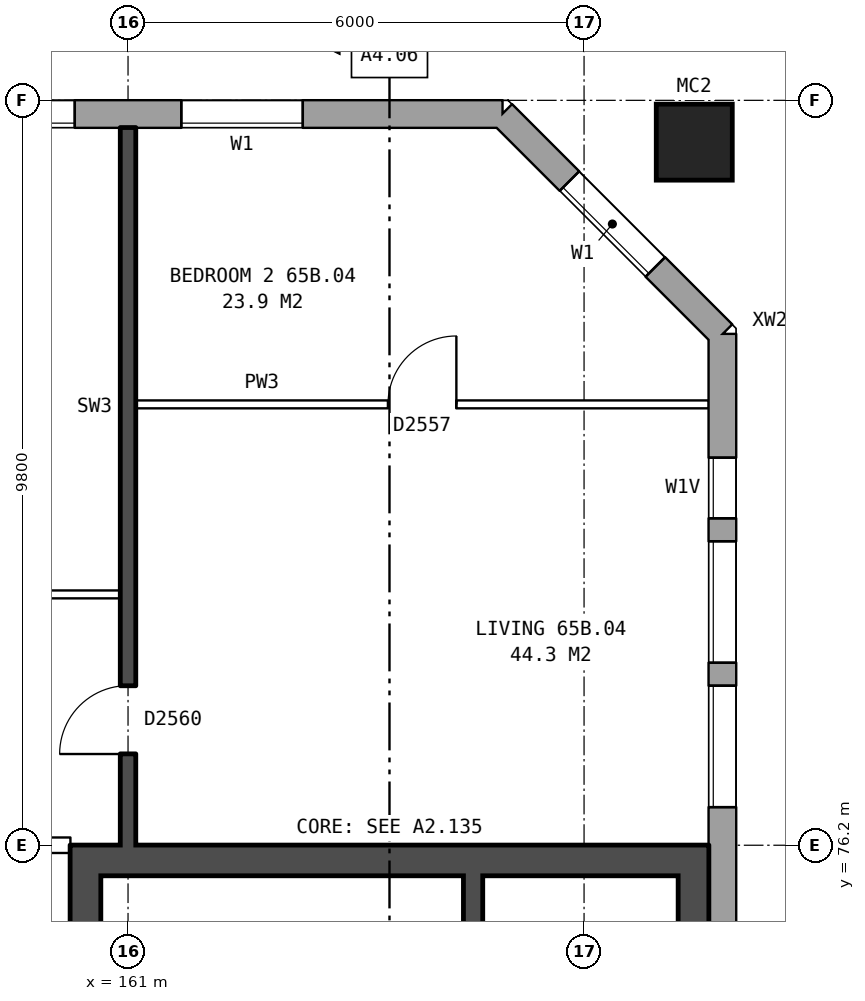
"""IFC4 building model, lengths in metres.
Left out: names, types, materials, properties, quantities, classifications, styles, units other than length and angle.
Written with IfcOpenShell. Run it as: python <this file> out.ifc"""

import sys

from ifc_helpers import new_model, si_unit, direction, frame, frame_2d, origin, origin_2d, place, context, subcontext, project, spatial, rectangle, hollow_rectangle, extrude, element, fill, save


model = new_model("IFC4")
c1 = context("Model", 3, precision=1e-05, world=origin(), true_north=direction((0.0, 1.0)))
c2 = subcontext(c1, "Body", "Model", "MODEL_VIEW")
j1 = project(units=[si_unit("LENGTHUNIT", "METRE"), si_unit("PLANEANGLEUNIT", "RADIAN")], contexts=[c1])
p1 = place(None, origin())
s1 = spatial("IfcSite", under=j1, at=p1, CompositionType="ELEMENT")
p2 = place(p1, origin())
s2 = spatial("IfcBuilding", under=s1, at=p2, CompositionType="ELEMENT")
p3 = place(p2, frame((0.0, 0.0, 230.7)))
s3 = spatial("IfcBuildingStorey", under=s2, at=p3, CompositionType="ELEMENT", Elevation=230.7)
p4 = place(p3, frame((168.45, 85.45, 0.0), z_axis=(0.0, 0.0, 1.0), x_axis=(1.0, 0.0, 0.0)))
e1 = element("IfcColumn", 1, at=p4, inside=s3, PredefinedType="COLUMN", context=c2, shape_type="SweptSolid", body=[
    extrude(hollow_rectangle(XDim=1.0, YDim=1.0, WallThickness=0.055, at=origin_2d()), origin(), (0.0, 0.0, 1.0), 3.1),
])
p5 = place(p3, frame((168.82, 57.075, 0.0), z_axis=(0.0, 0.0, 1.0), x_axis=(0.0, 1.0, 0.0)))
e2 = element("IfcWall", 2, at=p5, inside=s3, PredefinedType="STANDARD", context=c2, shape_type="SweptSolid", body=[
    extrude(rectangle(XDim=25.851, YDim=0.36, at=frame_2d((12.925, 0.0))), origin(), (0.0, 0.0, 1.0), 2.85),
])
p6 = place(p5, frame((1.575, 0.0, 1.7)))
e3 = element("IfcOpeningElement", 3, at=p6, cuts=e2, PredefinedType="OPENING", context=c2, shape_type="SweptSolid", body=[
    extrude(rectangle(XDim=0.6, YDim=0.9, at=frame_2d((0.3, 0.45))), frame((0.0, 0.19, 0.0), z_axis=(0.0, -1.0, 0.0), x_axis=(1.0, 0.0, 0.0)), (0.0, 0.0, 1.0), 0.38),
])
p7 = place(p5, frame((4.625, 0.0, 0.8)))
e4 = element("IfcOpeningElement", 4, at=p7, cuts=e2, PredefinedType="OPENING", context=c2, shape_type="SweptSolid", body=[
    extrude(rectangle(XDim=1.6, YDim=1.8, at=frame_2d((0.8, 0.9))), frame((0.0, 0.19, 0.0), z_axis=(0.0, -1.0, 0.0), x_axis=(1.0, 0.0, 0.0)), (0.0, 0.0, 1.0), 0.38),
])
p8 = place(p5, frame((19.625, 0.0, 0.8)))
e5 = element("IfcOpeningElement", 5, at=p8, cuts=e2, PredefinedType="OPENING", context=c2, shape_type="SweptSolid", body=[
    extrude(rectangle(XDim=1.6, YDim=1.8, at=frame_2d((0.8, 0.9))), frame((0.0, 0.19, 0.0), z_axis=(0.0, -1.0, 0.0), x_axis=(1.0, 0.0, 0.0)), (0.0, 0.0, 1.0), 0.38),
])
p9 = place(p5, frame((21.525, 0.0, 0.8)))
e6 = element("IfcOpeningElement", 6, at=p9, cuts=e2, PredefinedType="OPENING", context=c2, shape_type="SweptSolid", body=[
    extrude(rectangle(XDim=1.6, YDim=1.8, at=frame_2d((0.8, 0.9))), frame((0.0, 0.19, 0.0), z_axis=(0.0, -1.0, 0.0), x_axis=(1.0, 0.0, 0.0)), (0.0, 0.0, 1.0), 0.38),
])
p10 = place(p5, frame((2.475, 0.0, 0.8)))
e7 = element("IfcOpeningElement", 7, at=p10, cuts=e2, PredefinedType="OPENING", context=c2, shape_type="SweptSolid", body=[
    extrude(rectangle(XDim=1.2, YDim=1.8, at=frame_2d((0.6, 0.9))), frame((0.0, 0.19, 0.0), z_axis=(0.0, -1.0, 0.0), x_axis=(1.0, 0.0, 0.0)), (0.0, 0.0, 1.0), 0.38),
])
p11 = place(p5, frame((23.425, 0.0, 1.7)))
e8 = element("IfcOpeningElement", 8, at=p11, cuts=e2, PredefinedType="OPENING", context=c2, shape_type="SweptSolid", body=[
    extrude(rectangle(XDim=0.8, YDim=0.9, at=frame_2d((0.4, 0.45))), frame((0.0, 0.19, 0.0), z_axis=(0.0, -1.0, 0.0), x_axis=(1.0, 0.0, 0.0)), (0.0, 0.0, 1.0), 0.38),
])
p12 = place(p3, frame((168.82, 82.925, 0.0), z_axis=(0.0, 0.0, 1.0), x_axis=(-0.707106781187, 0.707106781187, 0.0)))
e9 = element("IfcWall", 9, at=p12, inside=s3, PredefinedType="STANDARD", context=c2, shape_type="SweptSolid", body=[
    extrude(rectangle(XDim=4.094, YDim=0.36, at=frame_2d((2.047, 0.0))), origin(), (0.0, 0.0, 1.0), 2.85),
])
p13 = place(p12, frame((1.247, 0.0, 0.8)))
e10 = element("IfcOpeningElement", 10, at=p13, cuts=e9, PredefinedType="OPENING", context=c2, shape_type="SweptSolid", body=[
    extrude(rectangle(XDim=1.6, YDim=1.8, at=frame_2d((0.8, 0.9))), frame((0.0, 0.19, 0.0), z_axis=(0.0, -1.0, 0.0), x_axis=(1.0, 0.0, 0.0)), (0.0, 0.0, 1.0), 0.38),
])
p14 = place(p3, frame((165.925, 85.82, 0.0), z_axis=(0.0, 0.0, 1.0), x_axis=(-1.0, 0.0, 0.0)))
e11 = element("IfcWall", 11, at=p14, inside=s3, PredefinedType="STANDARD", context=c2, shape_type="SweptSolid", body=[
    extrude(rectangle(XDim=33.875, YDim=0.36, at=frame_2d((16.938, 0.0))), origin(), (0.0, 0.0, 1.0), 2.85),
])
p15 = place(p14, frame((2.625, 0.0, 0.8)))
e12 = element("IfcOpeningElement", 12, at=p15, cuts=e11, PredefinedType="OPENING", context=c2, shape_type="SweptSolid", body=[
    extrude(rectangle(XDim=1.6, YDim=1.8, at=frame_2d((0.8, 0.9))), frame((0.0, 0.19, 0.0), z_axis=(0.0, -1.0, 0.0), x_axis=(1.0, 0.0, 0.0)), (0.0, 0.0, 1.0), 0.38),
])
p16 = place(p14, frame((5.625, 0.0, 0.8)))
e13 = element("IfcOpeningElement", 13, at=p16, cuts=e11, PredefinedType="OPENING", context=c2, shape_type="SweptSolid", body=[
    extrude(rectangle(XDim=1.6, YDim=1.8, at=frame_2d((0.8, 0.9))), frame((0.0, 0.19, 0.0), z_axis=(0.0, -1.0, 0.0), x_axis=(1.0, 0.0, 0.0)), (0.0, 0.0, 1.0), 0.38),
])
p17 = place(p14, frame((8.625, 0.0, 0.8)))
e14 = element("IfcOpeningElement", 14, at=p17, cuts=e11, PredefinedType="OPENING", context=c2, shape_type="SweptSolid", body=[
    extrude(rectangle(XDim=1.6, YDim=1.8, at=frame_2d((0.8, 0.9))), frame((0.0, 0.19, 0.0), z_axis=(0.0, -1.0, 0.0), x_axis=(1.0, 0.0, 0.0)), (0.0, 0.0, 1.0), 0.38),
])
p18 = place(p14, frame((11.125, 0.0, 0.8)))
e15 = element("IfcOpeningElement", 15, at=p18, cuts=e11, PredefinedType="OPENING", context=c2, shape_type="SweptSolid", body=[
    extrude(rectangle(XDim=1.4, YDim=1.8, at=frame_2d((0.7, 0.9))), frame((0.0, 0.19, 0.0), z_axis=(0.0, -1.0, 0.0), x_axis=(1.0, 0.0, 0.0)), (0.0, 0.0, 1.0), 0.38),
])
p19 = place(p14, frame((14.625, 0.0, 0.8)))
e16 = element("IfcOpeningElement", 16, at=p19, cuts=e11, PredefinedType="OPENING", context=c2, shape_type="SweptSolid", body=[
    extrude(rectangle(XDim=1.6, YDim=1.8, at=frame_2d((0.8, 0.9))), frame((0.0, 0.19, 0.0), z_axis=(0.0, -1.0, 0.0), x_axis=(1.0, 0.0, 0.0)), (0.0, 0.0, 1.0), 0.38),
])
p20 = place(p14, frame((17.125, 0.0, 0.25)))
e17 = element("IfcOpeningElement", 17, at=p20, cuts=e11, PredefinedType="OPENING", context=c2, shape_type="SweptSolid", body=[
    extrude(rectangle(XDim=0.6, YDim=1.2, at=frame_2d((0.3, 0.6))), frame((0.0, 0.19, 0.0), z_axis=(0.0, -1.0, 0.0), x_axis=(1.0, 0.0, 0.0)), (0.0, 0.0, 1.0), 0.38),
])
p21 = place(p14, frame((20.625, 0.0, 0.8)))
e18 = element("IfcOpeningElement", 18, at=p21, cuts=e11, PredefinedType="OPENING", context=c2, shape_type="SweptSolid", body=[
    extrude(rectangle(XDim=1.6, YDim=1.8, at=frame_2d((0.8, 0.9))), frame((0.0, 0.19, 0.0), z_axis=(0.0, -1.0, 0.0), x_axis=(1.0, 0.0, 0.0)), (0.0, 0.0, 1.0), 0.38),
])
p22 = place(p14, frame((23.625, 0.0, 0.8)))
e19 = element("IfcOpeningElement", 19, at=p22, cuts=e11, PredefinedType="OPENING", context=c2, shape_type="SweptSolid", body=[
    extrude(rectangle(XDim=1.6, YDim=1.8, at=frame_2d((0.8, 0.9))), frame((0.0, 0.19, 0.0), z_axis=(0.0, -1.0, 0.0), x_axis=(1.0, 0.0, 0.0)), (0.0, 0.0, 1.0), 0.38),
])
p23 = place(p14, frame((26.625, 0.0, 0.8)))
e20 = element("IfcOpeningElement", 20, at=p23, cuts=e11, PredefinedType="OPENING", context=c2, shape_type="SweptSolid", body=[
    extrude(rectangle(XDim=1.6, YDim=1.8, at=frame_2d((0.8, 0.9))), frame((0.0, 0.19, 0.0), z_axis=(0.0, -1.0, 0.0), x_axis=(1.0, 0.0, 0.0)), (0.0, 0.0, 1.0), 0.38),
])
p24 = place(p14, frame((29.625, 0.0, 0.8)))
e21 = element("IfcOpeningElement", 21, at=p24, cuts=e11, PredefinedType="OPENING", context=c2, shape_type="SweptSolid", body=[
    extrude(rectangle(XDim=1.6, YDim=1.8, at=frame_2d((0.8, 0.9))), frame((0.0, 0.19, 0.0), z_axis=(0.0, -1.0, 0.0), x_axis=(1.0, 0.0, 0.0)), (0.0, 0.0, 1.0), 0.38),
])
p25 = place(p14, frame((18.925, 0.0, 1.35)))
e22 = element("IfcOpeningElement", 22, at=p25, cuts=e11, PredefinedType="OPENING", context=c2, shape_type="SweptSolid", body=[
    extrude(rectangle(XDim=0.8, YDim=1.2, at=frame_2d((0.4, 0.6))), frame((0.0, 0.19, 0.0), z_axis=(0.0, -1.0, 0.0), x_axis=(1.0, 0.0, 0.0)), (0.0, 0.0, 1.0), 0.38),
])
p26 = place(p3, frame((160.44, 76.2, 0.0), z_axis=(0.0, 0.0, 1.0), x_axis=(0.0, -1.0, 0.0)))
e23 = element("IfcWall", 23, at=p26, inside=s3, PredefinedType="SHEAR", context=c2, shape_type="SweptSolid", body=[
    extrude(rectangle(XDim=12.4, YDim=0.4, at=frame_2d((6.2, 0.0))), origin(), (0.0, 0.0, 1.0), 2.85),
])
p27 = place(p26, frame((1.325, 0.0, 0.0)))
e24 = element("IfcOpeningElement", 24, at=p27, cuts=e23, PredefinedType="OPENING", context=c2, shape_type="SweptSolid", body=[
    extrude(rectangle(XDim=1.1, YDim=2.1, at=frame_2d((0.55, 1.05))), frame((0.0, 0.21, 0.0), z_axis=(0.0, -1.0, 0.0), x_axis=(1.0, 0.0, 0.0)), (0.0, 0.0, 1.0), 0.42),
])
p28 = place(p26, frame((4.825, 0.0, 0.0)))
e25 = element("IfcOpeningElement", 25, at=p28, cuts=e23, PredefinedType="OPENING", context=c2, shape_type="SweptSolid", body=[
    extrude(rectangle(XDim=0.85, YDim=2.1, at=frame_2d((0.425, 1.05))), frame((0.0, 0.21, 0.0), z_axis=(0.0, -1.0, 0.0), x_axis=(1.0, 0.0, 0.0)), (0.0, 0.0, 1.0), 0.42),
])
p29 = place(p26, frame((9.9, 0.0, 0.0)))
e26 = element("IfcOpeningElement", 26, at=p29, cuts=e23, PredefinedType="OPENING", context=c2, shape_type="SweptSolid", body=[
    extrude(rectangle(XDim=1.1, YDim=2.1, at=frame_2d((0.55, 1.05))), frame((0.0, 0.21, 0.0), z_axis=(0.0, -1.0, 0.0), x_axis=(1.0, 0.0, 0.0)), (0.0, 0.0, 1.0), 0.42),
])
p30 = place(p26, frame((8.125, 0.0, 0.0)))
e27 = element("IfcOpeningElement", 27, at=p30, cuts=e23, PredefinedType="OPENING", context=c2, shape_type="SweptSolid", body=[
    extrude(rectangle(XDim=0.85, YDim=2.1, at=frame_2d((0.425, 1.05))), frame((0.0, 0.21, 0.0), z_axis=(0.0, -1.0, 0.0), x_axis=(1.0, 0.0, 0.0)), (0.0, 0.0, 1.0), 0.42),
])
p31 = place(p3, frame((168.44, 76.2, 0.0), z_axis=(0.0, 0.0, 1.0), x_axis=(0.0, -1.0, 0.0)))
e28 = element("IfcWall", 28, at=p31, inside=s3, PredefinedType="SHEAR", context=c2, shape_type="SweptSolid", body=[
    extrude(rectangle(XDim=12.4, YDim=0.4, at=frame_2d((6.2, 0.0))), origin(), (0.0, 0.0, 1.0), 2.85),
])
p32 = place(p3, frame((160.64, 76.0, 0.0), z_axis=(0.0, 0.0, 1.0), x_axis=(1.0, 0.0, 0.0)))
e29 = element("IfcWall", 29, at=p32, inside=s3, PredefinedType="SHEAR", context=c2, shape_type="SweptSolid", body=[
    extrude(rectangle(XDim=7.6, YDim=0.4, at=frame_2d((3.8, 0.0))), origin(), (0.0, 0.0, 1.0), 2.85),
])
p33 = place(p3, frame((165.54, 75.8, 0.0), z_axis=(0.0, 0.0, 1.0), x_axis=(0.0, -1.0, 0.0)))
e30 = element("IfcWall", 30, at=p33, inside=s3, PredefinedType="SHEAR", context=c2, shape_type="SweptSolid", body=[
    extrude(rectangle(XDim=6.925, YDim=0.25, at=frame_2d((3.462, 0.0))), origin(), (0.0, 0.0, 1.0), 2.85),
])
p34 = place(p3, frame((157.24, 76.2, 0.0), z_axis=(0.0, 0.0, 1.0), x_axis=(1.0, 0.0, 0.0)))
e31 = element("IfcWall", 31, at=p34, inside=s3, PredefinedType="PARTITIONING", context=c2, shape_type="SweptSolid", body=[
    extrude(rectangle(XDim=3.0, YDim=0.2, at=frame_2d((1.5, 0.0))), origin(), (0.0, 0.0, 1.0), 2.85),
])
p35 = place(p34, frame((1.0, 0.0, 0.0)))
e32 = element("IfcOpeningElement", 32, at=p35, cuts=e31, PredefinedType="OPENING", context=c2, shape_type="SweptSolid", body=[
    extrude(rectangle(XDim=1.0, YDim=2.1, at=frame_2d((0.5, 1.05))), frame((0.0, 0.11, 0.0), z_axis=(0.0, -1.0, 0.0), x_axis=(1.0, 0.0, 0.0)), (0.0, 0.0, 1.0), 0.22),
])
p36 = place(p3, frame((155.1, 79.5, 0.0), z_axis=(0.0, 0.0, 1.0), x_axis=(1.0, 0.0, 0.0)))
e33 = element("IfcWall", 33, at=p36, inside=s3, PredefinedType="PARTITIONING", context=c2, shape_type="SweptSolid", body=[
    extrude(rectangle(XDim=5.8, YDim=0.1, at=frame_2d((2.9, 0.0))), origin(), (0.0, 0.0, 1.0), 2.85),
])
p37 = place(p36, frame((3.6, 0.0, 0.0)))
e34 = element("IfcOpeningElement", 34, at=p37, cuts=e33, PredefinedType="OPENING", context=c2, shape_type="SweptSolid", body=[
    extrude(rectangle(XDim=0.9, YDim=2.1, at=frame_2d((0.45, 1.05))), frame((0.0, 0.06, 0.0), z_axis=(0.0, -1.0, 0.0), x_axis=(1.0, 0.0, 0.0)), (0.0, 0.0, 1.0), 0.12),
])
p38 = place(p36, frame((0.7, 0.0, 0.0)))
e35 = element("IfcOpeningElement", 35, at=p38, cuts=e33, PredefinedType="OPENING", context=c2, shape_type="SweptSolid", body=[
    extrude(rectangle(XDim=0.9, YDim=2.1, at=frame_2d((0.45, 1.05))), frame((0.0, 0.06, 0.0), z_axis=(0.0, -1.0, 0.0), x_axis=(1.0, 0.0, 0.0)), (0.0, 0.0, 1.0), 0.12),
])
p39 = place(p3, frame((161.1, 82.0, 0.0), z_axis=(0.0, 0.0, 1.0), x_axis=(1.0, 0.0, 0.0)))
e36 = element("IfcWall", 36, at=p39, inside=s3, PredefinedType="PARTITIONING", context=c2, shape_type="SweptSolid", body=[
    extrude(rectangle(XDim=7.54, YDim=0.1, at=frame_2d((3.77, 0.0))), origin(), (0.0, 0.0, 1.0), 2.85),
])
p40 = place(p39, frame((3.32, 0.0, 0.0)))
e37 = element("IfcOpeningElement", 37, at=p40, cuts=e36, PredefinedType="OPENING", context=c2, shape_type="SweptSolid", body=[
    extrude(rectangle(XDim=0.9, YDim=2.1, at=frame_2d((0.45, 1.05))), frame((0.0, 0.06, 0.0), z_axis=(0.0, -1.0, 0.0), x_axis=(1.0, 0.0, 0.0)), (0.0, 0.0, 1.0), 0.12),
])
p41 = place(p3, frame((161.0, 76.2, 0.0), z_axis=(0.0, 0.0, 1.0), x_axis=(0.0, 1.0, 0.0)))
e38 = element("IfcWall", 38, at=p41, inside=s3, PredefinedType="SOLIDWALL", context=c2, shape_type="SweptSolid", body=[
    extrude(rectangle(XDim=9.44, YDim=0.2, at=frame_2d((4.72, 0.0))), origin(), (0.0, 0.0, 1.0), 2.85),
])
p42 = place(p41, frame((1.2, 0.0, 0.0)))
e39 = element("IfcOpeningElement", 39, at=p42, cuts=e38, PredefinedType="OPENING", context=c2, shape_type="SweptSolid", body=[
    extrude(rectangle(XDim=0.9, YDim=2.1, at=frame_2d((0.45, 1.05))), frame((0.0, 0.11, 0.0), z_axis=(0.0, -1.0, 0.0), x_axis=(1.0, 0.0, 0.0)), (0.0, 0.0, 1.0), 0.22),
])
p43 = place(p8, origin())
e40 = element("IfcWindow", 40, at=p43, inside=s3, PartitioningType="SINGLE_PANEL", PredefinedType="WINDOW", context=c2, shape_type="SweptSolid", body=[
    extrude(rectangle(XDim=1.6, YDim=1.8, at=frame_2d((0.8, 0.9))), frame((0.0, 0.15, 0.0), z_axis=(0.0, -1.0, 0.0), x_axis=(1.0, 0.0, 0.0)), (0.0, 0.0, 1.0), 0.06),
])
fill(e5, e40)
p44 = place(p9, origin())
e41 = element("IfcWindow", 41, at=p44, inside=s3, PartitioningType="SINGLE_PANEL", PredefinedType="WINDOW", context=c2, shape_type="SweptSolid", body=[
    extrude(rectangle(XDim=1.6, YDim=1.8, at=frame_2d((0.8, 0.9))), frame((0.0, 0.15, 0.0), z_axis=(0.0, -1.0, 0.0), x_axis=(1.0, 0.0, 0.0)), (0.0, 0.0, 1.0), 0.06),
])
fill(e6, e41)
p45 = place(p13, origin())
e42 = element("IfcWindow", 42, at=p45, inside=s3, PartitioningType="SINGLE_PANEL", PredefinedType="WINDOW", context=c2, shape_type="SweptSolid", body=[
    extrude(rectangle(XDim=1.6, YDim=1.8, at=frame_2d((0.8, 0.9))), frame((0.0, 0.15, 0.0), z_axis=(0.0, -1.0, 0.0), x_axis=(1.0, 0.0, 0.0)), (0.0, 0.0, 1.0), 0.06),
])
fill(e10, e42)
p46 = place(p15, origin())
e43 = element("IfcWindow", 43, at=p46, inside=s3, PartitioningType="SINGLE_PANEL", PredefinedType="WINDOW", context=c2, shape_type="SweptSolid", body=[
    extrude(rectangle(XDim=1.6, YDim=1.8, at=frame_2d((0.8, 0.9))), frame((0.0, 0.15, 0.0), z_axis=(0.0, -1.0, 0.0), x_axis=(1.0, 0.0, 0.0)), (0.0, 0.0, 1.0), 0.06),
])
fill(e12, e43)
p47 = place(p16, origin())
e44 = element("IfcWindow", 44, at=p47, inside=s3, PartitioningType="SINGLE_PANEL", PredefinedType="WINDOW", context=c2, shape_type="SweptSolid", body=[
    extrude(rectangle(XDim=1.6, YDim=1.8, at=frame_2d((0.8, 0.9))), frame((0.0, 0.15, 0.0), z_axis=(0.0, -1.0, 0.0), x_axis=(1.0, 0.0, 0.0)), (0.0, 0.0, 1.0), 0.06),
])
fill(e13, e44)
p48 = place(p40, origin())
e45 = element("IfcDoor", 45, at=p48, inside=s3, OperationType="SINGLE_SWING_RIGHT", PredefinedType="DOOR", context=c2, shape_type="SweptSolid", body=[
    extrude(rectangle(XDim=0.9, YDim=2.1, at=frame_2d((0.45, 1.05))), frame((0.0, 0.025, 0.0), z_axis=(0.0, -1.0, 0.0), x_axis=(1.0, 0.0, 0.0)), (0.0, 0.0, 1.0), 0.05),
])
fill(e37, e45)
p49 = place(p42, origin())
e46 = element("IfcDoor", 46, at=p49, inside=s3, OperationType="SINGLE_SWING_LEFT", PredefinedType="DOOR", context=c2, shape_type="SweptSolid", body=[
    extrude(rectangle(XDim=0.9, YDim=2.1, at=frame_2d((0.45, 1.05))), frame((0.0, 0.025, 0.0), z_axis=(0.0, -1.0, 0.0), x_axis=(1.0, 0.0, 0.0)), (0.0, 0.0, 1.0), 0.05),
])
fill(e39, e46)
p50 = place(p11, origin())
e47 = element("IfcWindow", 47, at=p50, inside=s3, PartitioningType="SINGLE_PANEL", PredefinedType="WINDOW", context=c2, shape_type="SweptSolid", body=[
    extrude(rectangle(XDim=0.8, YDim=0.9, at=frame_2d((0.4, 0.45))), frame((0.0, 0.15, 0.0), z_axis=(0.0, -1.0, 0.0), x_axis=(1.0, 0.0, 0.0)), (0.0, 0.0, 1.0), 0.06),
])
fill(e8, e47)
save(model, sys.argv[1])
